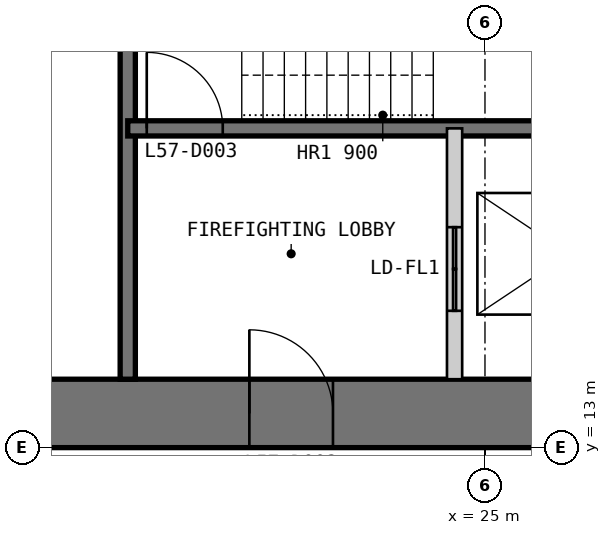
"""IFC4 building model, lengths in metres.
Left out: names, types, materials, properties, quantities, classifications, styles, units other than length and angle.
Written with IfcOpenShell. Run it as: python <this file> out.ifc"""

import sys

from ifc_helpers import new_model, si_unit, direction, frame, frame_2d, origin, place, context, subcontext, project, spatial, polyline, rectangle, outline, extrude, element, fill, save


model = new_model("IFC4")
c1 = context("Model", 3, precision=1e-05, world=origin(), true_north=direction((0.0, 1.0)))
c2 = subcontext(c1, "Body", "Model", "MODEL_VIEW")
j1 = project(units=[si_unit("LENGTHUNIT", "METRE"), si_unit("PLANEANGLEUNIT", "RADIAN")], contexts=[c1])
p1 = place(None, origin())
s1 = spatial("IfcSite", under=j1, at=p1, CompositionType="ELEMENT")
p2 = place(p1, origin())
s2 = spatial("IfcBuilding", under=s1, at=p2, CompositionType="ELEMENT")
p3 = place(p2, frame((0.0, 0.0, 245.8)))
s3 = spatial("IfcBuildingStorey", under=s2, at=p3, CompositionType="ELEMENT", Elevation=245.8)
p4 = place(p3, frame((13.0, 13.45, 0.0), z_axis=(0.0, 0.0, 1.0), x_axis=(1.0, 0.0, 0.0)))
e1 = element("IfcWall", 1, at=p4, inside=s3, PredefinedType="SHEAR", context=c2, shape_type="SweptSolid", body=[
    extrude(outline(polyline([(0.0, -0.45), (24.0, -0.45), (23.1, 0.45), (0.9, 0.45), (0.0, -0.45)])), origin(), (0.0, 0.0, 1.0), 3.4),
])
p5 = place(p4, frame((4.9, 0.0, 0.0)))
e2 = element("IfcOpeningElement", 2, at=p5, cuts=e1, PredefinedType="OPENING", context=c2, shape_type="SweptSolid", body=[
    extrude(rectangle(XDim=1.0, YDim=2.2, at=frame_2d((0.5, 1.1))), frame((0.0, 0.46, 0.0), z_axis=(0.0, -1.0, 0.0), x_axis=(1.0, 0.0, 0.0)), (0.0, 0.0, 1.0), 0.92),
])
p6 = place(p4, frame((8.9, 0.0, 0.0)))
e3 = element("IfcOpeningElement", 3, at=p6, cuts=e1, PredefinedType="OPENING", context=c2, shape_type="SweptSolid", body=[
    extrude(rectangle(XDim=1.1, YDim=2.2, at=frame_2d((0.55, 1.1))), frame((0.0, 0.46, 0.0), z_axis=(0.0, -1.0, 0.0), x_axis=(1.0, 0.0, 0.0)), (0.0, 0.0, 1.0), 0.92),
])
p7 = place(p4, frame((15.05, 0.0, 0.0)))
e4 = element("IfcOpeningElement", 4, at=p7, cuts=e1, PredefinedType="OPENING", context=c2, shape_type="SweptSolid", body=[
    extrude(rectangle(XDim=0.9, YDim=2.2, at=frame_2d((0.45, 1.1))), frame((0.0, 0.46, 0.0), z_axis=(0.0, -1.0, 0.0), x_axis=(1.0, 0.0, 0.0)), (0.0, 0.0, 1.0), 0.92),
])
p8 = place(p4, frame((17.9, 0.0, 0.0)))
e5 = element("IfcOpeningElement", 5, at=p8, cuts=e1, PredefinedType="OPENING", context=c2, shape_type="SweptSolid", body=[
    extrude(rectangle(XDim=1.0, YDim=2.2, at=frame_2d((0.5, 1.1))), frame((0.0, 0.46, 0.0), z_axis=(0.0, -1.0, 0.0), x_axis=(1.0, 0.0, 0.0)), (0.0, 0.0, 1.0), 0.92),
])
p9 = place(p4, frame((21.4, 0.0, 0.0)))
e6 = element("IfcOpeningElement", 6, at=p9, cuts=e1, PredefinedType="OPENING", context=c2, shape_type="SweptSolid", body=[
    extrude(rectangle(XDim=1.0, YDim=2.2, at=frame_2d((0.5, 1.1))), frame((0.0, 0.46, 0.0), z_axis=(0.0, -1.0, 0.0), x_axis=(1.0, 0.0, 0.0)), (0.0, 0.0, 1.0), 0.92),
])
p10 = place(p3, frame((20.3, 13.9, 0.0), z_axis=(0.0, 0.0, 1.0), x_axis=(0.0, 1.0, 0.0)))
e7 = element("IfcWall", 7, at=p10, inside=s3, PredefinedType="SOLIDWALL", context=c2, shape_type="SweptSolid", body=[
    extrude(rectangle(XDim=16.1, YDim=0.2, at=frame_2d((8.05, 0.0))), origin(), (0.0, 0.0, 1.0), 3.2),
])
p11 = place(p10, frame((7.85, 0.0, 0.0)))
e8 = element("IfcOpeningElement", 8, at=p11, cuts=e7, PredefinedType="OPENING", context=c2, shape_type="SweptSolid", body=[
    extrude(rectangle(XDim=0.9, YDim=2.2, at=frame_2d((0.45, 1.1))), frame((0.0, 0.11, 0.0), z_axis=(0.0, -1.0, 0.0), x_axis=(1.0, 0.0, 0.0)), (0.0, 0.0, 1.0), 0.22),
])
p12 = place(p10, frame((11.75, 0.0, 0.0)))
e9 = element("IfcOpeningElement", 9, at=p12, cuts=e7, PredefinedType="OPENING", context=c2, shape_type="SweptSolid", body=[
    extrude(rectangle(XDim=0.9, YDim=2.2, at=frame_2d((0.45, 1.1))), frame((0.0, 0.11, 0.0), z_axis=(0.0, -1.0, 0.0), x_axis=(1.0, 0.0, 0.0)), (0.0, 0.0, 1.0), 0.22),
])
p13 = place(p10, frame((14.55, 0.0, 0.0)))
e10 = element("IfcOpeningElement", 10, at=p13, cuts=e7, PredefinedType="OPENING", context=c2, shape_type="SweptSolid", body=[
    extrude(rectangle(XDim=0.9, YDim=2.2, at=frame_2d((0.45, 1.1))), frame((0.0, 0.11, 0.0), z_axis=(0.0, -1.0, 0.0), x_axis=(1.0, 0.0, 0.0)), (0.0, 0.0, 1.0), 0.22),
])
p14 = place(p3, frame((20.3, 17.2, 0.0), z_axis=(0.0, 0.0, 1.0), x_axis=(1.0, 0.0, 0.0)))
e11 = element("IfcWall", 11, at=p14, inside=s3, PredefinedType="SOLIDWALL", context=c2, shape_type="SweptSolid", body=[
    extrude(rectangle(XDim=9.4, YDim=0.2, at=frame_2d((4.7, 0.0))), origin(), (0.0, 0.0, 1.0), 3.2),
])
p15 = place(p14, frame((0.25, 0.0, 0.0)))
e12 = element("IfcOpeningElement", 12, at=p15, cuts=e11, PredefinedType="OPENING", context=c2, shape_type="SweptSolid", body=[
    extrude(rectangle(XDim=1.0, YDim=2.2, at=frame_2d((0.5, 1.1))), frame((0.0, 0.11, 0.0), z_axis=(0.0, -1.0, 0.0), x_axis=(1.0, 0.0, 0.0)), (0.0, 0.0, 1.0), 0.22),
])
p16 = place(p3, frame((24.6, 13.9, 0.0), z_axis=(0.0, 0.0, 1.0), x_axis=(0.0, 1.0, 0.0)))
e13 = element("IfcWall", 13, at=p16, inside=s3, PredefinedType="PARTITIONING", context=c2, shape_type="SweptSolid", body=[
    extrude(rectangle(XDim=3.3, YDim=0.2, at=frame_2d((1.65, 0.0))), origin(), (0.0, 0.0, 1.0), 3.2),
])
p17 = place(p16, frame((0.9, 0.0, 0.0)))
e14 = element("IfcOpeningElement", 14, at=p17, cuts=e13, PredefinedType="OPENING", context=c2, shape_type="SweptSolid", body=[
    extrude(rectangle(XDim=1.1, YDim=2.2, at=frame_2d((0.55, 1.1))), frame((0.0, 0.11, 0.0), z_axis=(0.0, -1.0, 0.0), x_axis=(1.0, 0.0, 0.0)), (0.0, 0.0, 1.0), 0.22),
])
p18 = place(p6, origin())
e15 = element("IfcDoor", 15, at=p18, inside=s3, OperationType="SINGLE_SWING_LEFT", PredefinedType="DOOR", context=c2, shape_type="SweptSolid", body=[
    extrude(rectangle(XDim=1.1, YDim=2.2, at=frame_2d((0.55, 1.1))), frame((0.0, 0.025, 0.0), z_axis=(0.0, -1.0, 0.0), x_axis=(1.0, 0.0, 0.0)), (0.0, 0.0, 1.0), 0.05),
    extrude(outline(polyline([(0.0, 0.0), (0.04, 0.0), (0.04, 2.16), (1.06, 2.16), (1.06, 0.0), (1.1, 0.0), (1.1, 2.2), (0.0, 2.2), (0.0, 0.0)])), frame((0.0, 0.3, 0.0), z_axis=(0.0, -1.0, 0.0), x_axis=(1.0, 0.0, 0.0)), (0.0, 0.0, 1.0), 0.6),
])
fill(e3, e15)
p19 = place(p15, origin())
e16 = element("IfcDoor", 16, at=p19, inside=s3, OperationType="SINGLE_SWING_LEFT", PredefinedType="DOOR", context=c2, shape_type="SweptSolid", body=[
    extrude(rectangle(XDim=1.0, YDim=2.2, at=frame_2d((0.5, 1.1))), frame((0.0, 0.025, 0.0), z_axis=(0.0, -1.0, 0.0), x_axis=(1.0, 0.0, 0.0)), (0.0, 0.0, 1.0), 0.05),
])
fill(e12, e16)
p20 = place(p17, origin())
e17 = element("IfcDoor", 17, at=p20, inside=s3, OperationType="DOUBLE_DOOR_SLIDING", PredefinedType="DOOR", context=c2, shape_type="SweptSolid", body=[
    extrude(rectangle(XDim=1.1, YDim=2.2, at=frame_2d((0.55, 1.1))), frame((0.0, 0.025, 0.0), z_axis=(0.0, -1.0, 0.0), x_axis=(1.0, 0.0, 0.0)), (0.0, 0.0, 1.0), 0.05),
])
fill(e14, e17)
save(model, sys.argv[1])
